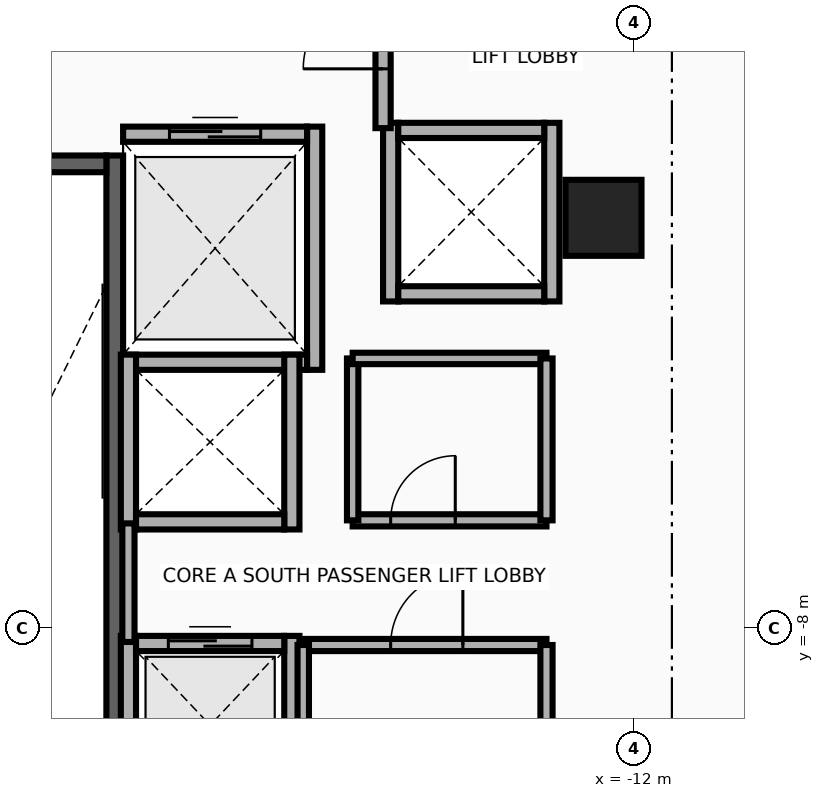
"""IFC4 building model, lengths in metres.
Left out: names, types, materials, properties, quantities, classifications, styles, units other than length and angle.
Written with IfcOpenShell. Run it as: python <this file> out.ifc"""

import sys

from ifc_helpers import new_model, si_unit, direction, frame, frame_2d, origin, origin_2d, place, context, subcontext, project, spatial, rectangle, extrude, source, transform, mapped, element, fill, save


model = new_model("IFC4")
c1 = context("Model", 3, precision=1e-05, world=origin(), true_north=direction((0.0, 1.0)))
c2 = subcontext(c1, "Body", "Model", "MODEL_VIEW")
j1 = project(units=[si_unit("LENGTHUNIT", "METRE"), si_unit("PLANEANGLEUNIT", "RADIAN")], contexts=[c1])
p1 = place(None, origin())
s1 = spatial("IfcSite", under=j1, at=p1, CompositionType="ELEMENT")
p2 = place(p1, origin())
s2 = spatial("IfcBuilding", under=s1, at=p2, CompositionType="ELEMENT")
p3 = place(p2, frame((0.0, 0.0, 188.4)))
s3 = spatial("IfcBuildingStorey", under=s2, at=p3, CompositionType="ELEMENT", Elevation=188.4)
p4 = place(p3, frame((-18.83, -10.525, 0.0), z_axis=(0.0, 0.0, 1.0), x_axis=(0.0, 1.0, 0.0)))
e1 = element("IfcWall", 1, at=p4, inside=s3, PredefinedType="SHEAR", context=c2, shape_type="SweptSolid", body=[
    extrude(rectangle(XDim=8.745, YDim=0.22, at=frame_2d((4.373, 0.0))), origin(), (0.0, 0.0, 1.0), 3.63),
])
p5 = place(p3, frame((-22.05, -1.89, 0.0), z_axis=(0.0, 0.0, 1.0), x_axis=(1.0, 0.0, 0.0)))
e2 = element("IfcWall", 2, at=p5, inside=s3, PredefinedType="SHEAR", context=c2, shape_type="SweptSolid", body=[
    extrude(rectangle(XDim=3.11, YDim=0.22, at=frame_2d((1.555, 0.0))), origin(), (0.0, 0.0, 1.0), 3.63),
])
p6 = place(p5, frame((1.0, 0.0, 0.0)))
e3 = element("IfcOpeningElement", 3, at=p6, cuts=e2, PredefinedType="OPENING", context=c2, shape_type="SweptSolid", body=[
    extrude(rectangle(XDim=1.1, YDim=2.15, at=frame_2d((0.55, 1.075))), frame((0.0, 0.125, 0.0), z_axis=(0.0, -1.0, 0.0), x_axis=(1.0, 0.0, 0.0)), (0.0, 0.0, 1.0), 0.25),
])
m1 = source(origin(), c2, "Body", "SweptSolid", [
    extrude(rectangle(XDim=1.0, YDim=1.0, at=origin_2d()), origin(), (0.0, 0.0, 1.0), 3.95),
])
p7 = place(p3, frame((-12.4, -2.6, 0.0), z_axis=(0.0, 0.0, 1.0), x_axis=(1.0, 0.0, 0.0)))
e4 = element("IfcColumn", 4, at=p7, inside=s3, PredefinedType="COLUMN", context=c2, shape_type="MappedRepresentation", body=[
    mapped(m1, transform((0.0, 0.0, 0.0), x_axis=(1.0, 0.0, 0.0), y_axis=(0.0, 1.0, 0.0), z_axis=(0.0, 0.0, 1.0), scale=1.0)),
])
p8 = place(p3, frame((-16.2, -4.6, 0.0), z_axis=(0.0, 0.0, 1.0), x_axis=(0.0, 1.0, 0.0)))
e5 = element("IfcWall", 5, at=p8, inside=s3, PredefinedType="MOVABLE", context=c2, shape_type="SweptSolid", body=[
    extrude(rectangle(XDim=3.2, YDim=0.2, at=frame_2d((1.6, 0.0))), origin(), (0.0, 0.0, 1.0), 3.63),
])
p9 = place(p3, frame((-18.72, -4.5, 0.0), z_axis=(0.0, 0.0, 1.0), x_axis=(1.0, 0.0, 0.0)))
e6 = element("IfcWall", 6, at=p9, inside=s3, PredefinedType="MOVABLE", context=c2, shape_type="SweptSolid", body=[
    extrude(rectangle(XDim=2.42, YDim=0.2, at=frame_2d((1.21, 0.0))), origin(), (0.0, 0.0, 1.0), 3.63),
])
p10 = place(p3, frame((-18.72, -1.5, 0.0), z_axis=(0.0, 0.0, 1.0), x_axis=(1.0, 0.0, 0.0)))
e7 = element("IfcWall", 7, at=p10, inside=s3, PredefinedType="MOVABLE", context=c2, shape_type="SweptSolid", body=[
    extrude(rectangle(XDim=2.42, YDim=0.2, at=frame_2d((1.21, 0.0))), origin(), (0.0, 0.0, 1.0), 3.63),
])
p11 = place(p10, frame((0.61, 0.0, 0.0)))
e8 = element("IfcOpeningElement", 8, at=p11, cuts=e7, PredefinedType="OPENING", context=c2, shape_type="SweptSolid", body=[
    extrude(rectangle(XDim=1.2, YDim=2.1, at=frame_2d((0.6, 1.05))), frame((0.0, 0.115, 0.0), z_axis=(0.0, -1.0, 0.0), x_axis=(1.0, 0.0, 0.0)), (0.0, 0.0, 1.0), 0.23),
])
for number, where, z_axis, x_axis in (
    (9, (-18.65, -10.45, 0.0), (0.0, 0.0, 1.0), (0.0, 1.0, 0.0)),
    (10, (-16.5, -10.45, 0.0), (0.0, 0.0, 1.0), (0.0, 1.0, 0.0)),
):
    element("IfcWall", number, at=place(p3, frame(where, z_axis=z_axis, x_axis=x_axis)), inside=s3, PredefinedType="MOVABLE", context=c2, shape_type="SweptSolid", body=[
        extrude(rectangle(XDim=2.35, YDim=0.2, at=frame_2d((1.175, 0.0))), origin(), (0.0, 0.0, 1.0), 2.665),
    ])
p12 = place(p3, frame((-18.55, -8.2, 0.0), z_axis=(0.0, 0.0, 1.0), x_axis=(1.0, 0.0, 0.0)))
e11 = element("IfcWall", 11, at=p12, inside=s3, PredefinedType="MOVABLE", context=c2, shape_type="SweptSolid", body=[
    extrude(rectangle(XDim=1.95, YDim=0.2, at=frame_2d((0.975, 0.0))), origin(), (0.0, 0.0, 1.0), 3.63),
])
p13 = place(p12, frame((0.425, 0.0, 0.0)))
e12 = element("IfcOpeningElement", 12, at=p13, cuts=e11, PredefinedType="OPENING", context=c2, shape_type="SweptSolid", body=[
    extrude(rectangle(XDim=1.1, YDim=2.1, at=frame_2d((0.55, 1.05))), frame((0.0, 0.115, 0.0), z_axis=(0.0, -1.0, 0.0), x_axis=(1.0, 0.0, 0.0)), (0.0, 0.0, 1.0), 0.23),
])
for number, where, z_axis, x_axis in (
    (13, (-18.65, -6.7, 0.0), (0.0, 0.0, 1.0), (0.0, 1.0, 0.0)),
    (14, (-16.5, -6.7, 0.0), (0.0, 0.0, 1.0), (0.0, 1.0, 0.0)),
):
    element("IfcWall", number, at=place(p3, frame(where, z_axis=z_axis, x_axis=x_axis)), inside=s3, PredefinedType="MOVABLE", context=c2, shape_type="SweptSolid", body=[
        extrude(rectangle(XDim=2.3, YDim=0.2, at=frame_2d((1.15, 0.0))), origin(), (0.0, 0.0, 1.0), 3.63),
    ])
p14 = place(p3, frame((-18.55, -6.6, 0.0), z_axis=(0.0, 0.0, 1.0), x_axis=(1.0, 0.0, 0.0)))
e15 = element("IfcWall", 15, at=p14, inside=s3, PredefinedType="MOVABLE", context=c2, shape_type="SweptSolid", body=[
    extrude(rectangle(XDim=1.95, YDim=0.2, at=frame_2d((0.975, 0.0))), origin(), (0.0, 0.0, 1.0), 3.63),
])
for number, where, z_axis, x_axis in (
    (16, (-15.2, -3.7, 0.0), (0.0, 0.0, 1.0), (0.0, 1.0, 0.0)),
    (17, (-13.08, -3.7, 0.0), (0.0, 0.0, 1.0), (0.0, 1.0, 0.0)),
):
    element("IfcWall", number, at=place(p3, frame(where, z_axis=z_axis, x_axis=x_axis)), inside=s3, PredefinedType="MOVABLE", context=c2, shape_type="SweptSolid", body=[
        extrude(rectangle(XDim=2.35, YDim=0.2, at=frame_2d((1.175, 0.0))), origin(), (0.0, 0.0, 1.0), 3.63),
    ])
for number, where, z_axis, x_axis in (
    (18, (-15.1, -3.6, 0.0), (0.0, 0.0, 1.0), (1.0, 0.0, 0.0)),
    (19, (-15.1, -1.45, 0.0), (0.0, 0.0, 1.0), (1.0, 0.0, 0.0)),
):
    element("IfcWall", number, at=place(p3, frame(where, z_axis=z_axis, x_axis=x_axis)), inside=s3, PredefinedType="MOVABLE", context=c2, shape_type="SweptSolid", body=[
        extrude(rectangle(XDim=1.92, YDim=0.2, at=frame_2d((0.96, 0.0))), origin(), (0.0, 0.0, 1.0), 3.63),
    ])
p15 = place(p3, frame((-15.3, -1.42, 0.0), z_axis=(0.0, 0.0, 1.0), x_axis=(0.0, 1.0, 0.0)))
e20 = element("IfcWall", 20, at=p15, inside=s3, PredefinedType="PARTITIONING", context=c2, shape_type="SweptSolid", body=[
    extrude(rectangle(XDim=2.67, YDim=0.2, at=frame_2d((1.335, 0.0))), origin(), (0.0, 0.0, 1.0), 3.63),
])
p16 = place(p15, frame((0.78, 0.0, 0.0)))
e21 = element("IfcOpeningElement", 21, at=p16, cuts=e20, PredefinedType="OPENING", context=c2, shape_type="SweptSolid", body=[
    extrude(rectangle(XDim=1.05, YDim=2.15, at=frame_2d((0.525, 1.075))), frame((0.0, 0.115, 0.0), z_axis=(0.0, -1.0, 0.0), x_axis=(1.0, 0.0, 0.0)), (0.0, 0.0, 1.0), 0.23),
])
p17 = place(p3, frame((-18.65, -8.18, 0.0), z_axis=(0.0, 0.0, 1.0), x_axis=(0.0, 1.0, 0.0)))
e22 = element("IfcWall", 22, at=p17, inside=s3, PredefinedType="PARTITIONING", context=c2, shape_type="SweptSolid", body=[
    extrude(rectangle(XDim=1.56, YDim=0.16, at=frame_2d((0.78, 0.0))), origin(), (0.0, 0.0, 1.0), 3.63),
])
p18 = place(p3, frame((-16.35, -8.22, 0.0), z_axis=(0.0, 0.0, 1.0), x_axis=(1.0, 0.0, 0.0)))
e23 = element("IfcWall", 23, at=p18, inside=s3, PredefinedType="PARTITIONING", context=c2, shape_type="SweptSolid", body=[
    extrude(rectangle(XDim=3.2, YDim=0.16, at=frame_2d((1.6, 0.0))), origin(), (0.0, 0.0, 1.0), 3.63),
])
p19 = place(p18, frame((1.15, 0.0, 0.0)))
e24 = element("IfcOpeningElement", 24, at=p19, cuts=e23, PredefinedType="OPENING", context=c2, shape_type="SweptSolid", body=[
    extrude(rectangle(XDim=0.95, YDim=2.15, at=frame_2d((0.475, 1.075))), frame((0.0, 0.095, 0.0), z_axis=(0.0, -1.0, 0.0), x_axis=(1.0, 0.0, 0.0)), (0.0, 0.0, 1.0), 0.19),
])
p20 = place(p3, frame((-16.35, -10.35, 0.0), z_axis=(0.0, 0.0, 1.0), x_axis=(0.0, 1.0, 0.0)))
e25 = element("IfcWall", 25, at=p20, inside=s3, PredefinedType="PARTITIONING", context=c2, shape_type="SweptSolid", body=[
    extrude(rectangle(XDim=2.13, YDim=0.15, at=frame_2d((1.065, 0.0))), origin(), (0.0, 0.0, 1.0), 3.63),
])
p21 = place(p3, frame((-13.15, -10.35, 0.0), z_axis=(0.0, 0.0, 1.0), x_axis=(0.0, 1.0, 0.0)))
e26 = element("IfcWall", 26, at=p21, inside=s3, PredefinedType="PARTITIONING", context=c2, shape_type="SweptSolid", body=[
    extrude(rectangle(XDim=2.13, YDim=0.16, at=frame_2d((1.065, 0.0))), origin(), (0.0, 0.0, 1.0), 3.63),
])
p22 = place(p3, frame((-15.7, -6.58, 0.0), z_axis=(0.0, 0.0, 1.0), x_axis=(1.0, 0.0, 0.0)))
e27 = element("IfcWall", 27, at=p22, inside=s3, PredefinedType="PARTITIONING", context=c2, shape_type="SweptSolid", body=[
    extrude(rectangle(XDim=2.55, YDim=0.16, at=frame_2d((1.275, 0.0))), origin(), (0.0, 0.0, 1.0), 3.63),
])
p23 = place(p22, frame((0.5, 0.0, 0.0)))
e28 = element("IfcOpeningElement", 28, at=p23, cuts=e27, PredefinedType="OPENING", context=c2, shape_type="SweptSolid", body=[
    extrude(rectangle(XDim=0.85, YDim=2.05, at=frame_2d((0.425, 1.025))), frame((0.0, 0.095, 0.0), z_axis=(0.0, -1.0, 0.0), x_axis=(1.0, 0.0, 0.0)), (0.0, 0.0, 1.0), 0.19),
])
p24 = place(p3, frame((-15.7, -6.58, 0.0), z_axis=(0.0, 0.0, 1.0), x_axis=(0.0, 1.0, 0.0)))
e29 = element("IfcWall", 29, at=p24, inside=s3, PredefinedType="PARTITIONING", context=c2, shape_type="SweptSolid", body=[
    extrude(rectangle(XDim=2.13, YDim=0.15, at=frame_2d((1.065, 0.0))), origin(), (0.0, 0.0, 1.0), 3.63),
])
p25 = place(p3, frame((-15.7, -4.45, 0.0), z_axis=(0.0, 0.0, 1.0), x_axis=(1.0, 0.0, 0.0)))
e30 = element("IfcWall", 30, at=p25, inside=s3, PredefinedType="PARTITIONING", context=c2, shape_type="SweptSolid", body=[
    extrude(rectangle(XDim=2.55, YDim=0.15, at=frame_2d((1.275, 0.0))), origin(), (0.0, 0.0, 1.0), 3.63),
])
p26 = place(p3, frame((-13.15, -6.58, 0.0), z_axis=(0.0, 0.0, 1.0), x_axis=(0.0, 1.0, 0.0)))
e31 = element("IfcWall", 31, at=p26, inside=s3, PredefinedType="PARTITIONING", context=c2, shape_type="SweptSolid", body=[
    extrude(rectangle(XDim=2.13, YDim=0.16, at=frame_2d((1.065, 0.0))), origin(), (0.0, 0.0, 1.0), 3.63),
])
p27 = place(p11, origin())
e32 = element("IfcDoor", 32, at=p27, inside=s3, OperationType="DOUBLE_DOOR_SLIDING", PredefinedType="DOOR", context=c2, shape_type="SweptSolid", body=[
    extrude(rectangle(XDim=1.2, YDim=2.1, at=frame_2d((0.6, 1.05))), frame((0.0, 0.025, 0.0), z_axis=(0.0, -1.0, 0.0), x_axis=(1.0, 0.0, 0.0)), (0.0, 0.0, 1.0), 0.05),
])
fill(e8, e32)
p28 = place(p13, origin())
e33 = element("IfcDoor", 33, at=p28, inside=s3, OperationType="DOUBLE_DOOR_SLIDING", PredefinedType="DOOR", context=c2, shape_type="SweptSolid", body=[
    extrude(rectangle(XDim=1.1, YDim=2.1, at=frame_2d((0.55, 1.05))), frame((0.0, 0.025, 0.0), z_axis=(0.0, -1.0, 0.0), x_axis=(1.0, 0.0, 0.0)), (0.0, 0.0, 1.0), 0.05),
])
fill(e12, e33)
p29 = place(p16, origin())
e34 = element("IfcDoor", 34, at=p29, inside=s3, OperationType="SINGLE_SWING_RIGHT", PredefinedType="DOOR", context=c2, shape_type="SweptSolid", body=[
    extrude(rectangle(XDim=1.05, YDim=2.15, at=frame_2d((0.525, 1.075))), frame((0.0, 0.025, 0.0), z_axis=(0.0, -1.0, 0.0), x_axis=(1.0, 0.0, 0.0)), (0.0, 0.0, 1.0), 0.05),
])
fill(e21, e34)
p30 = place(p19, origin())
e35 = element("IfcDoor", 35, at=p30, inside=s3, OperationType="SINGLE_SWING_LEFT", PredefinedType="DOOR", context=c2, shape_type="SweptSolid", body=[
    extrude(rectangle(XDim=0.95, YDim=2.15, at=frame_2d((0.475, 1.075))), frame((0.0, 0.025, 0.0), z_axis=(0.0, -1.0, 0.0), x_axis=(1.0, 0.0, 0.0)), (0.0, 0.0, 1.0), 0.05),
])
fill(e24, e35)
p31 = place(p23, origin())
e36 = element("IfcDoor", 36, at=p31, inside=s3, OperationType="SINGLE_SWING_RIGHT", PredefinedType="DOOR", context=c2, shape_type="SweptSolid", body=[
    extrude(rectangle(XDim=0.85, YDim=2.05, at=frame_2d((0.425, 1.025))), frame((0.0, 0.025, 0.0), z_axis=(0.0, -1.0, 0.0), x_axis=(1.0, 0.0, 0.0)), (0.0, 0.0, 1.0), 0.05),
])
fill(e28, e36)
save(model, sys.argv[1])
